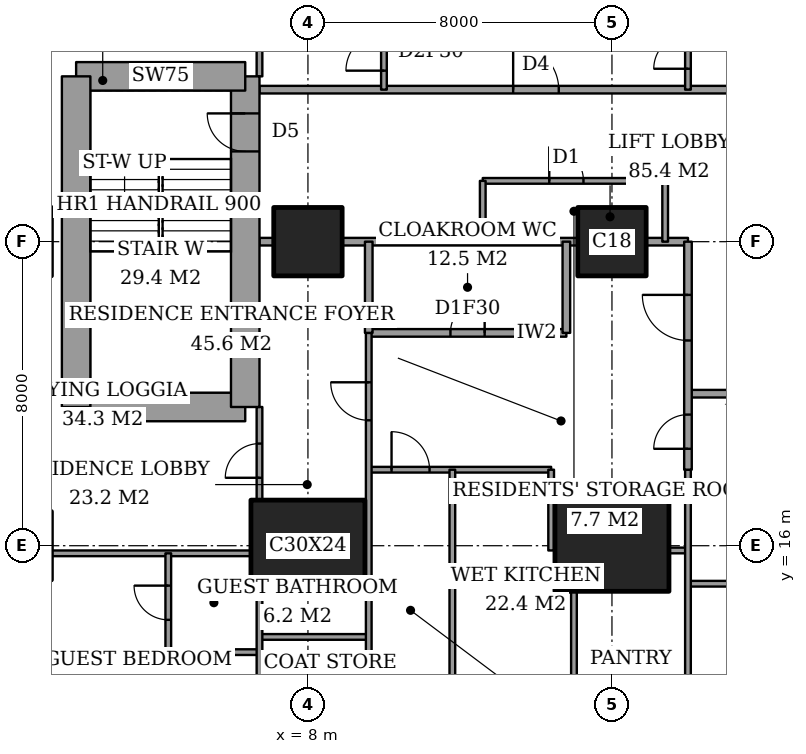
"""IFC4 building model, lengths in metres.
Left out: names, types, materials, properties, quantities, classifications, styles, units other than length and angle.
Written with IfcOpenShell. Run it as: python <this file> out.ifc"""

import sys

from ifc_helpers import new_model, si_unit, direction, frame, frame_2d, origin, origin_2d, place, context, subcontext, project, spatial, rectangle, extrude, element, fill, save


model = new_model("IFC4")
c1 = context("Model", 3, precision=1e-05, world=origin(), true_north=direction((0.0, 1.0)))
c2 = subcontext(c1, "Body", "Model", "MODEL_VIEW")
j1 = project(units=[si_unit("LENGTHUNIT", "METRE"), si_unit("PLANEANGLEUNIT", "RADIAN")], contexts=[c1])
p1 = place(None, origin())
s1 = spatial("IfcSite", under=j1, at=p1, CompositionType="ELEMENT")
p2 = place(p1, origin())
s2 = spatial("IfcBuilding", under=s1, at=p2, CompositionType="ELEMENT")
p3 = place(p2, frame((0.0, 0.0, 189.4)))
s3 = spatial("IfcBuildingStorey", under=s2, at=p3, CompositionType="ELEMENT", Elevation=189.4)
p4 = place(p3, frame((8.0, 16.0, 0.0), z_axis=(0.0, 0.0, 1.0), x_axis=(1.0, 0.0, 0.0)))
e1 = element("IfcColumn", 1, at=p4, inside=s3, PredefinedType="COLUMN", context=c2, shape_type="SweptSolid", body=[
    extrude(rectangle(XDim=3.0, YDim=2.4, at=origin_2d()), origin(), (0.0, 0.0, 1.0), 3.6),
])
p5 = place(p3, frame((8.0, 24.0, 0.0), z_axis=(0.0, 0.0, 1.0), x_axis=(1.0, 0.0, 0.0)))
e2 = element("IfcColumn", 2, at=p5, inside=s3, PredefinedType="COLUMN", context=c2, shape_type="SweptSolid", body=[
    extrude(rectangle(XDim=1.8, YDim=1.8, at=origin_2d()), origin(), (0.0, 0.0, 1.0), 3.6),
])
p6 = place(p3, frame((16.0, 16.0, 0.0), z_axis=(0.0, 0.0, 1.0), x_axis=(1.0, 0.0, 0.0)))
e3 = element("IfcColumn", 3, at=p6, inside=s3, PredefinedType="COLUMN", context=c2, shape_type="SweptSolid", body=[
    extrude(rectangle(XDim=3.0, YDim=2.4, at=origin_2d()), origin(), (0.0, 0.0, 1.0), 3.6),
])
p7 = place(p3, frame((16.0, 24.0, 0.0), z_axis=(0.0, 0.0, 1.0), x_axis=(1.0, 0.0, 0.0)))
e4 = element("IfcColumn", 4, at=p7, inside=s3, PredefinedType="COLUMN", context=c2, shape_type="SweptSolid", body=[
    extrude(rectangle(XDim=1.8, YDim=1.8, at=origin_2d()), origin(), (0.0, 0.0, 1.0), 3.6),
])
p8 = place(p3, frame((1.9, 19.65, 0.0), z_axis=(0.0, 0.0, 1.0), x_axis=(1.0, 0.0, 0.0)))
e5 = element("IfcWall", 5, at=p8, inside=s3, PredefinedType="SHEAR", context=c2, shape_type="SweptSolid", body=[
    extrude(rectangle(XDim=4.45, YDim=0.75, at=frame_2d((2.225, 0.0))), origin(), (0.0, 0.0, 1.0), 3.6),
])
p9 = place(p3, frame((6.35, 19.65, 0.0), z_axis=(0.0, 0.0, 1.0), x_axis=(0.0, 1.0, 0.0)))
e6 = element("IfcWall", 6, at=p9, inside=s3, PredefinedType="SHEAR", context=c2, shape_type="SweptSolid", body=[
    extrude(rectangle(XDim=8.7, YDim=0.75, at=frame_2d((4.35, 0.0))), origin(), (0.0, 0.0, 1.0), 3.6),
])
p10 = place(p9, frame((6.725, 0.0, 0.0)))
e7 = element("IfcOpeningElement", 7, at=p10, cuts=e6, PredefinedType="OPENING", context=c2, shape_type="SweptSolid", body=[
    extrude(rectangle(XDim=1.0, YDim=2.1, at=frame_2d((0.5, 1.05))), frame((0.0, 0.385, 0.0), z_axis=(0.0, -1.0, 0.0), x_axis=(1.0, 0.0, 0.0)), (0.0, 0.0, 1.0), 0.77),
])
p11 = place(p3, frame((6.35, 28.35, 0.0), z_axis=(0.0, 0.0, 1.0), x_axis=(-1.0, 0.0, 0.0)))
e8 = element("IfcWall", 8, at=p11, inside=s3, PredefinedType="SHEAR", context=c2, shape_type="SweptSolid", body=[
    extrude(rectangle(XDim=4.45, YDim=0.75, at=frame_2d((2.225, 0.0))), origin(), (0.0, 0.0, 1.0), 3.6),
])
p12 = place(p3, frame((1.9, 28.35, 0.0), z_axis=(0.0, 0.0, 1.0), x_axis=(0.0, -1.0, 0.0)))
e9 = element("IfcWall", 9, at=p12, inside=s3, PredefinedType="SHEAR", context=c2, shape_type="SweptSolid", body=[
    extrude(rectangle(XDim=8.7, YDim=0.75, at=frame_2d((4.35, 0.0))), origin(), (0.0, 0.0, 1.0), 3.6),
])
p13 = place(p3, frame((4.325, 13.2, 0.0), z_axis=(0.0, 0.0, 1.0), x_axis=(1.0, 0.0, 0.0)))
e10 = element("IfcWall", 10, at=p13, inside=s3, PredefinedType="PARTITIONING", context=c2, shape_type="SweptSolid", body=[
    extrude(rectangle(XDim=2.4, YDim=0.15, at=frame_2d((1.2, 0.0))), origin(), (0.0, 0.0, 1.0), 3.35),
])
p14 = place(p3, frame((6.725, 13.6, 0.0), z_axis=(0.0, 0.0, 1.0), x_axis=(1.0, 0.0, 0.0)))
e11 = element("IfcWall", 11, at=p14, inside=s3, PredefinedType="PARTITIONING", context=c2, shape_type="SweptSolid", body=[
    extrude(rectangle(XDim=2.875, YDim=0.15, at=frame_2d((1.438, 0.0))), origin(), (0.0, 0.0, 1.0), 3.35),
])
p15 = place(p3, frame((18.0, 15.0, 0.0), z_axis=(0.0, 0.0, 1.0), x_axis=(1.0, 0.0, 0.0)))
e12 = element("IfcWall", 12, at=p15, inside=s3, PredefinedType="PARTITIONING", context=c2, shape_type="SweptSolid", body=[
    extrude(rectangle(XDim=6.0, YDim=0.15, at=frame_2d((3.0, 0.0))), origin(), (0.0, 0.0, 1.0), 3.35),
])
p16 = place(p3, frame((1.25, 15.8, 0.0), z_axis=(0.0, 0.0, 1.0), x_axis=(1.0, 0.0, 0.0)))
e13 = element("IfcWall", 13, at=p16, inside=s3, PredefinedType="PARTITIONING", context=c2, shape_type="SweptSolid", body=[
    extrude(rectangle(XDim=5.25, YDim=0.15, at=frame_2d((2.625, 0.0))), origin(), (0.0, 0.0, 1.0), 3.35),
])
p17 = place(p3, frame((17.5, 15.875, 0.0), z_axis=(0.0, 0.0, 1.0), x_axis=(1.0, 0.0, 0.0)))
e14 = element("IfcWall", 14, at=p17, inside=s3, PredefinedType="PARTITIONING", context=c2, shape_type="SweptSolid", body=[
    extrude(rectangle(XDim=0.5, YDim=0.15, at=frame_2d((0.25, 0.0))), origin(), (0.0, 0.0, 1.0), 2.634),
])
p18 = place(p3, frame((9.6, 18.0, 0.0), z_axis=(0.0, 0.0, 1.0), x_axis=(1.0, 0.0, 0.0)))
e15 = element("IfcWall", 15, at=p18, inside=s3, PredefinedType="PARTITIONING", context=c2, shape_type="SweptSolid", body=[
    extrude(rectangle(XDim=4.8, YDim=0.15, at=frame_2d((2.4, 0.0))), origin(), (0.0, 0.0, 1.0), 3.35),
])
p19 = place(p18, frame((0.6, 0.0, 0.0)))
e16 = element("IfcOpeningElement", 16, at=p19, cuts=e15, PredefinedType="OPENING", context=c2, shape_type="SweptSolid", body=[
    extrude(rectangle(XDim=1.0, YDim=2.1, at=frame_2d((0.5, 1.05))), frame((0.0, 0.085, 0.0), z_axis=(0.0, -1.0, 0.0), x_axis=(1.0, 0.0, 0.0)), (0.0, 0.0, 1.0), 0.17),
])
p20 = place(p3, frame((18.0, 20.0, 0.0), z_axis=(0.0, 0.0, 1.0), x_axis=(1.0, 0.0, 0.0)))
e17 = element("IfcWall", 17, at=p20, inside=s3, PredefinedType="PARTITIONING", context=c2, shape_type="SweptSolid", body=[
    extrude(rectangle(XDim=6.0, YDim=0.2, at=frame_2d((3.0, 0.0))), origin(), (0.0, 0.0, 1.0), 3.35),
])
p21 = place(p3, frame((9.6, 21.6, 0.0), z_axis=(0.0, 0.0, 1.0), x_axis=(1.0, 0.0, 0.0)))
e18 = element("IfcWall", 18, at=p21, inside=s3, PredefinedType="PARTITIONING", context=c2, shape_type="SweptSolid", body=[
    extrude(rectangle(XDim=5.2, YDim=0.2, at=frame_2d((2.6, 0.0))), origin(), (0.0, 0.0, 1.0), 3.35),
])
p22 = place(p21, frame((2.15, 0.0, 0.0)))
e19 = element("IfcOpeningElement", 19, at=p22, cuts=e18, PredefinedType="OPENING", context=c2, shape_type="SweptSolid", body=[
    extrude(rectangle(XDim=0.9, YDim=2.1, at=frame_2d((0.45, 1.05))), frame((0.0, 0.11, 0.0), z_axis=(0.0, -1.0, 0.0), x_axis=(1.0, 0.0, 0.0)), (0.0, 0.0, 1.0), 0.22),
])
p23 = place(p3, frame((6.725, 24.0, 0.0), z_axis=(0.0, 0.0, 1.0), x_axis=(1.0, 0.0, 0.0)))
e20 = element("IfcWall", 20, at=p23, inside=s3, PredefinedType="PARTITIONING", context=c2, shape_type="SweptSolid", body=[
    extrude(rectangle(XDim=0.375, YDim=0.2, at=frame_2d((0.188, 0.0))), origin(), (0.0, 0.0, 1.0), 3.35),
])
p24 = place(p3, frame((8.9, 24.0, 0.0), z_axis=(0.0, 0.0, 1.0), x_axis=(1.0, 0.0, 0.0)))
e21 = element("IfcWall", 21, at=p24, inside=s3, PredefinedType="PARTITIONING", context=c2, shape_type="SweptSolid", body=[
    extrude(rectangle(XDim=6.2, YDim=0.2, at=frame_2d((3.1, 0.0))), origin(), (0.0, 0.0, 1.0), 3.35),
])
p25 = place(p3, frame((16.9, 24.0, 0.0), z_axis=(0.0, 0.0, 1.0), x_axis=(1.0, 0.0, 0.0)))
e22 = element("IfcWall", 22, at=p25, inside=s3, PredefinedType="PARTITIONING", context=c2, shape_type="SweptSolid", body=[
    extrude(rectangle(XDim=1.1, YDim=0.2, at=frame_2d((0.55, 0.0))), origin(), (0.0, 0.0, 1.0), 3.35),
])
p26 = place(p3, frame((12.6, 25.6, 0.0), z_axis=(0.0, 0.0, 1.0), x_axis=(1.0, 0.0, 0.0)))
e23 = element("IfcWall", 23, at=p26, inside=s3, PredefinedType="PARTITIONING", context=c2, shape_type="SweptSolid", body=[
    extrude(rectangle(XDim=4.8, YDim=0.15, at=frame_2d((2.4, 0.0))), origin(), (0.0, 0.0, 1.0), 3.35),
])
p27 = place(p26, frame((1.75, 0.0, 0.0)))
e24 = element("IfcOpeningElement", 24, at=p27, cuts=e23, PredefinedType="OPENING", context=c2, shape_type="SweptSolid", body=[
    extrude(rectangle(XDim=0.9, YDim=2.1, at=frame_2d((0.45, 1.05))), frame((0.0, 0.085, 0.0), z_axis=(0.0, -1.0, 0.0), x_axis=(1.0, 0.0, 0.0)), (0.0, 0.0, 1.0), 0.17),
])
p28 = place(p3, frame((6.725, 28.0, 0.0), z_axis=(0.0, 0.0, 1.0), x_axis=(1.0, 0.0, 0.0)))
e25 = element("IfcWall", 25, at=p28, inside=s3, PredefinedType="PARTITIONING", context=c2, shape_type="SweptSolid", body=[
    extrude(rectangle(XDim=17.275, YDim=0.2, at=frame_2d((8.637, 0.0))), origin(), (0.0, 0.0, 1.0), 3.35),
])
p29 = place(p28, frame((6.675, 0.0, 0.0)))
e26 = element("IfcOpeningElement", 26, at=p29, cuts=e25, PredefinedType="OPENING", context=c2, shape_type="SweptSolid", body=[
    extrude(rectangle(XDim=1.2, YDim=2.4, at=frame_2d((0.6, 1.2))), frame((0.0, 0.11, 0.0), z_axis=(0.0, -1.0, 0.0), x_axis=(1.0, 0.0, 0.0)), (0.0, 0.0, 1.0), 0.22),
])
p30 = place(p3, frame((4.325, 13.2, 0.0), z_axis=(0.0, 0.0, 1.0), x_axis=(0.0, 1.0, 0.0)))
e27 = element("IfcWall", 27, at=p30, inside=s3, PredefinedType="PARTITIONING", context=c2, shape_type="SweptSolid", body=[
    extrude(rectangle(XDim=2.6, YDim=0.15, at=frame_2d((1.3, 0.0))), origin(), (0.0, 0.0, 1.0), 3.35),
])
p31 = place(p30, frame((0.85, 0.0, 0.0)))
e28 = element("IfcOpeningElement", 28, at=p31, cuts=e27, PredefinedType="OPENING", context=c2, shape_type="SweptSolid", body=[
    extrude(rectangle(XDim=0.9, YDim=2.1, at=frame_2d((0.45, 1.05))), frame((0.0, 0.085, 0.0), z_axis=(0.0, -1.0, 0.0), x_axis=(1.0, 0.0, 0.0)), (0.0, 0.0, 1.0), 0.17),
])
p32 = place(p3, frame((6.725, 10.6, 0.0), z_axis=(0.0, 0.0, 1.0), x_axis=(0.0, 1.0, 0.0)))
e29 = element("IfcWall", 29, at=p32, inside=s3, PredefinedType="PARTITIONING", context=c2, shape_type="SweptSolid", body=[
    extrude(rectangle(XDim=4.2, YDim=0.15, at=frame_2d((2.1, 0.0))), origin(), (0.0, 0.0, 1.0), 3.35),
])
p33 = place(p3, frame((6.725, 17.2, 0.0), z_axis=(0.0, 0.0, 1.0), x_axis=(0.0, 1.0, 0.0)))
e30 = element("IfcWall", 30, at=p33, inside=s3, PredefinedType="PARTITIONING", context=c2, shape_type="SweptSolid", body=[
    extrude(rectangle(XDim=2.45, YDim=0.15, at=frame_2d((1.225, 0.0))), origin(), (0.0, 0.0, 1.0), 3.35),
])
p34 = place(p33, frame((0.587, 0.0, 0.0)))
e31 = element("IfcOpeningElement", 31, at=p34, cuts=e30, PredefinedType="OPENING", context=c2, shape_type="SweptSolid", body=[
    extrude(rectangle(XDim=0.9, YDim=2.1, at=frame_2d((0.45, 1.05))), frame((0.0, 0.085, 0.0), z_axis=(0.0, -1.0, 0.0), x_axis=(1.0, 0.0, 0.0)), (0.0, 0.0, 1.0), 0.17),
])
p35 = place(p3, frame((6.725, 28.35, 0.0), z_axis=(0.0, 0.0, 1.0), x_axis=(0.0, 1.0, 0.0)))
e32 = element("IfcWall", 32, at=p35, inside=s3, PredefinedType="PARTITIONING", context=c2, shape_type="SweptSolid", body=[
    extrude(rectangle(XDim=2.45, YDim=0.15, at=frame_2d((1.225, 0.0))), origin(), (0.0, 0.0, 1.0), 3.35),
])
p36 = place(p35, frame((0.913, 0.0, 0.0)))
e33 = element("IfcOpeningElement", 33, at=p36, cuts=e32, PredefinedType="OPENING", context=c2, shape_type="SweptSolid", body=[
    extrude(rectangle(XDim=1.0, YDim=2.1, at=frame_2d((0.5, 1.05))), frame((0.0, 0.085, 0.0), z_axis=(0.0, -1.0, 0.0), x_axis=(1.0, 0.0, 0.0)), (0.0, 0.0, 1.0), 0.17),
])
p37 = place(p3, frame((9.6, 21.6, 0.0), z_axis=(0.0, 0.0, 1.0), x_axis=(0.0, 1.0, 0.0)))
e34 = element("IfcWall", 34, at=p37, inside=s3, PredefinedType="PARTITIONING", context=c2, shape_type="SweptSolid", body=[
    extrude(rectangle(XDim=2.4, YDim=0.2, at=frame_2d((1.2, 0.0))), origin(), (0.0, 0.0, 1.0), 3.35),
])
p38 = place(p3, frame((9.6, 10.6, 0.0), z_axis=(0.0, 0.0, 1.0), x_axis=(0.0, 1.0, 0.0)))
e35 = element("IfcWall", 35, at=p38, inside=s3, PredefinedType="PARTITIONING", context=c2, shape_type="SweptSolid", body=[
    extrude(rectangle(XDim=11.0, YDim=0.15, at=frame_2d((5.5, 0.0))), origin(), (0.0, 0.0, 1.0), 3.35),
])
p39 = place(p38, frame((8.7, 0.0, 0.0)))
e36 = element("IfcOpeningElement", 36, at=p39, cuts=e35, PredefinedType="OPENING", context=c2, shape_type="SweptSolid", body=[
    extrude(rectangle(XDim=1.0, YDim=2.1, at=frame_2d((0.5, 1.05))), frame((0.0, 0.085, 0.0), z_axis=(0.0, -1.0, 0.0), x_axis=(1.0, 0.0, 0.0)), (0.0, 0.0, 1.0), 0.17),
])
p40 = place(p3, frame((10.0, 28.0, 0.0), z_axis=(0.0, 0.0, 1.0), x_axis=(0.0, 1.0, 0.0)))
e37 = element("IfcWall", 37, at=p40, inside=s3, PredefinedType="PARTITIONING", context=c2, shape_type="SweptSolid", body=[
    extrude(rectangle(XDim=9.4, YDim=0.15, at=frame_2d((4.7, 0.0))), origin(), (0.0, 0.0, 1.0), 3.35),
])
p41 = place(p40, frame((0.5, 0.0, 0.0)))
e38 = element("IfcOpeningElement", 38, at=p41, cuts=e37, PredefinedType="OPENING", context=c2, shape_type="SweptSolid", body=[
    extrude(rectangle(XDim=1.0, YDim=2.1, at=frame_2d((0.5, 1.05))), frame((0.0, 0.085, 0.0), z_axis=(0.0, -1.0, 0.0), x_axis=(1.0, 0.0, 0.0)), (0.0, 0.0, 1.0), 0.17),
])
p42 = place(p3, frame((11.8, 10.6, 0.0), z_axis=(0.0, 0.0, 1.0), x_axis=(0.0, 1.0, 0.0)))
e39 = element("IfcWall", 39, at=p42, inside=s3, PredefinedType="PARTITIONING", context=c2, shape_type="SweptSolid", body=[
    extrude(rectangle(XDim=7.4, YDim=0.15, at=frame_2d((3.7, 0.0))), origin(), (0.0, 0.0, 1.0), 3.35),
])
p43 = place(p3, frame((12.6, 24.0, 0.0), z_axis=(0.0, 0.0, 1.0), x_axis=(0.0, 1.0, 0.0)))
e40 = element("IfcWall", 40, at=p43, inside=s3, PredefinedType="PARTITIONING", context=c2, shape_type="SweptSolid", body=[
    extrude(rectangle(XDim=1.6, YDim=0.15, at=frame_2d((0.8, 0.0))), origin(), (0.0, 0.0, 1.0), 3.35),
])
p44 = place(p3, frame((14.4, 15.875, 0.0), z_axis=(0.0, 0.0, 1.0), x_axis=(0.0, 1.0, 0.0)))
e41 = element("IfcWall", 41, at=p44, inside=s3, PredefinedType="PARTITIONING", context=c2, shape_type="SweptSolid", body=[
    extrude(rectangle(XDim=2.125, YDim=0.15, at=frame_2d((1.062, 0.0))), origin(), (0.0, 0.0, 1.0), 3.35),
])
p45 = place(p3, frame((14.8, 21.6, 0.0), z_axis=(0.0, 0.0, 1.0), x_axis=(0.0, 1.0, 0.0)))
e42 = element("IfcWall", 42, at=p45, inside=s3, PredefinedType="PARTITIONING", context=c2, shape_type="SweptSolid", body=[
    extrude(rectangle(XDim=2.4, YDim=0.2, at=frame_2d((1.2, 0.0))), origin(), (0.0, 0.0, 1.0), 3.35),
])
p46 = place(p3, frame((15.0, 10.6, 0.0), z_axis=(0.0, 0.0, 1.0), x_axis=(0.0, 1.0, 0.0)))
e43 = element("IfcWall", 43, at=p46, inside=s3, PredefinedType="PARTITIONING", context=c2, shape_type="SweptSolid", body=[
    extrude(rectangle(XDim=4.2, YDim=0.15, at=frame_2d((2.1, 0.0))), origin(), (0.0, 0.0, 1.0), 3.35),
])
p47 = place(p3, frame((17.4, 24.0, 0.0), z_axis=(0.0, 0.0, 1.0), x_axis=(0.0, 1.0, 0.0)))
e44 = element("IfcWall", 44, at=p47, inside=s3, PredefinedType="PARTITIONING", context=c2, shape_type="SweptSolid", body=[
    extrude(rectangle(XDim=1.6, YDim=0.15, at=frame_2d((0.8, 0.0))), origin(), (0.0, 0.0, 1.0), 3.35),
])
p48 = place(p3, frame((18.0, 18.0, 0.0), z_axis=(0.0, 0.0, 1.0), x_axis=(0.0, 1.0, 0.0)))
e45 = element("IfcWall", 45, at=p48, inside=s3, PredefinedType="PARTITIONING", context=c2, shape_type="SweptSolid", body=[
    extrude(rectangle(XDim=6.0, YDim=0.2, at=frame_2d((3.0, 0.0))), origin(), (0.0, 0.0, 1.0), 3.35),
])
p49 = place(p48, frame((3.4, 0.0, 0.0)))
e46 = element("IfcOpeningElement", 46, at=p49, cuts=e45, PredefinedType="OPENING", context=c2, shape_type="SweptSolid", body=[
    extrude(rectangle(XDim=1.2, YDim=2.4, at=frame_2d((0.6, 1.2))), frame((0.0, 0.11, 0.0), z_axis=(0.0, -1.0, 0.0), x_axis=(1.0, 0.0, 0.0)), (0.0, 0.0, 1.0), 0.22),
])
p50 = place(p48, frame((0.55, 0.0, 0.0)))
e47 = element("IfcOpeningElement", 47, at=p50, cuts=e45, PredefinedType="OPENING", context=c2, shape_type="SweptSolid", body=[
    extrude(rectangle(XDim=0.9, YDim=2.1, at=frame_2d((0.45, 1.05))), frame((0.0, 0.11, 0.0), z_axis=(0.0, -1.0, 0.0), x_axis=(1.0, 0.0, 0.0)), (0.0, 0.0, 1.0), 0.22),
])
p51 = place(p3, frame((18.0, 10.6, 0.0), z_axis=(0.0, 0.0, 1.0), x_axis=(0.0, 1.0, 0.0)))
e48 = element("IfcWall", 48, at=p51, inside=s3, PredefinedType="PARTITIONING", context=c2, shape_type="SweptSolid", body=[
    extrude(rectangle(XDim=7.4, YDim=0.15, at=frame_2d((3.7, 0.0))), origin(), (0.0, 0.0, 1.0), 3.35),
])
p52 = place(p3, frame((18.0, 28.0, 0.0), z_axis=(0.0, 0.0, 1.0), x_axis=(0.0, 1.0, 0.0)))
e49 = element("IfcWall", 49, at=p52, inside=s3, PredefinedType="PARTITIONING", context=c2, shape_type="SweptSolid", body=[
    extrude(rectangle(XDim=9.4, YDim=0.15, at=frame_2d((4.7, 0.0))), origin(), (0.0, 0.0, 1.0), 3.35),
])
p53 = place(p52, frame((0.55, 0.0, 0.0)))
e50 = element("IfcOpeningElement", 50, at=p53, cuts=e49, PredefinedType="OPENING", context=c2, shape_type="SweptSolid", body=[
    extrude(rectangle(XDim=0.9, YDim=2.1, at=frame_2d((0.45, 1.05))), frame((0.0, 0.085, 0.0), z_axis=(0.0, -1.0, 0.0), x_axis=(1.0, 0.0, 0.0)), (0.0, 0.0, 1.0), 0.17),
])
p54 = place(p31, origin())
e51 = element("IfcDoor", 51, at=p54, inside=s3, OperationType="SINGLE_SWING_LEFT", PredefinedType="DOOR", context=c2, shape_type="SweptSolid", body=[
    extrude(rectangle(XDim=0.9, YDim=2.1, at=frame_2d((0.45, 1.05))), frame((0.0, 0.025, 0.0), z_axis=(0.0, -1.0, 0.0), x_axis=(1.0, 0.0, 0.0)), (0.0, 0.0, 1.0), 0.05),
])
fill(e28, e51)
p55 = place(p34, origin())
e52 = element("IfcDoor", 52, at=p55, inside=s3, OperationType="SINGLE_SWING_RIGHT", PredefinedType="DOOR", context=c2, shape_type="SweptSolid", body=[
    extrude(rectangle(XDim=0.9, YDim=2.1, at=frame_2d((0.45, 1.05))), frame((0.0, 0.025, 0.0), z_axis=(0.0, -1.0, 0.0), x_axis=(1.0, 0.0, 0.0)), (0.0, 0.0, 1.0), 0.05),
])
fill(e31, e52)
p56 = place(p39, origin())
e53 = element("IfcDoor", 53, at=p56, inside=s3, OperationType="SINGLE_SWING_LEFT", PredefinedType="DOOR", context=c2, shape_type="SweptSolid", body=[
    extrude(rectangle(XDim=1.0, YDim=2.1, at=frame_2d((0.5, 1.05))), frame((0.0, 0.025, 0.0), z_axis=(0.0, -1.0, 0.0), x_axis=(1.0, 0.0, 0.0)), (0.0, 0.0, 1.0), 0.05),
])
fill(e36, e53)
p57 = place(p22, origin())
e54 = element("IfcDoor", 54, at=p57, inside=s3, OperationType="SINGLE_SWING_LEFT", PredefinedType="DOOR", context=c2, shape_type="SweptSolid", body=[
    extrude(rectangle(XDim=0.9, YDim=2.1, at=frame_2d((0.45, 1.05))), frame((0.0, 0.025, 0.0), z_axis=(0.0, -1.0, 0.0), x_axis=(1.0, 0.0, 0.0)), (0.0, 0.0, 1.0), 0.05),
])
fill(e19, e54)
p58 = place(p49, origin())
e55 = element("IfcDoor", 55, at=p58, inside=s3, OperationType="SINGLE_SWING_LEFT", PredefinedType="DOOR", context=c2, shape_type="SweptSolid", body=[
    extrude(rectangle(XDim=1.2, YDim=2.4, at=frame_2d((0.6, 1.2))), frame((0.0, 0.025, 0.0), z_axis=(0.0, -1.0, 0.0), x_axis=(1.0, 0.0, 0.0)), (0.0, 0.0, 1.0), 0.05),
])
fill(e46, e55)
p59 = place(p19, origin())
e56 = element("IfcDoor", 56, at=p59, inside=s3, OperationType="SINGLE_SWING_RIGHT", PredefinedType="DOOR", context=c2, shape_type="SweptSolid", body=[
    extrude(rectangle(XDim=1.0, YDim=2.1, at=frame_2d((0.5, 1.05))), frame((0.0, 0.025, 0.0), z_axis=(0.0, -1.0, 0.0), x_axis=(1.0, 0.0, 0.0)), (0.0, 0.0, 1.0), 0.05),
])
fill(e16, e56)
p60 = place(p50, origin())
e57 = element("IfcDoor", 57, at=p60, inside=s3, OperationType="SINGLE_SWING_RIGHT", PredefinedType="DOOR", context=c2, shape_type="SweptSolid", body=[
    extrude(rectangle(XDim=0.9, YDim=2.1, at=frame_2d((0.45, 1.05))), frame((0.0, 0.025, 0.0), z_axis=(0.0, -1.0, 0.0), x_axis=(1.0, 0.0, 0.0)), (0.0, 0.0, 1.0), 0.05),
])
fill(e47, e57)
p61 = place(p41, origin())
e58 = element("IfcDoor", 58, at=p61, inside=s3, OperationType="SINGLE_SWING_RIGHT", PredefinedType="DOOR", context=c2, shape_type="SweptSolid", body=[
    extrude(rectangle(XDim=1.0, YDim=2.1, at=frame_2d((0.5, 1.05))), frame((0.0, 0.025, 0.0), z_axis=(0.0, -1.0, 0.0), x_axis=(1.0, 0.0, 0.0)), (0.0, 0.0, 1.0), 0.05),
])
fill(e38, e58)
p62 = place(p29, origin())
e59 = element("IfcDoor", 59, at=p62, inside=s3, OperationType="SINGLE_SWING_RIGHT", PredefinedType="DOOR", context=c2, shape_type="SweptSolid", body=[
    extrude(rectangle(XDim=1.2, YDim=2.4, at=frame_2d((0.6, 1.2))), frame((0.0, 0.025, 0.0), z_axis=(0.0, -1.0, 0.0), x_axis=(1.0, 0.0, 0.0)), (0.0, 0.0, 1.0), 0.05),
])
fill(e26, e59)
p63 = place(p53, origin())
e60 = element("IfcDoor", 60, at=p63, inside=s3, OperationType="SINGLE_SWING_RIGHT", PredefinedType="DOOR", context=c2, shape_type="SweptSolid", body=[
    extrude(rectangle(XDim=0.9, YDim=2.1, at=frame_2d((0.45, 1.05))), frame((0.0, 0.025, 0.0), z_axis=(0.0, -1.0, 0.0), x_axis=(1.0, 0.0, 0.0)), (0.0, 0.0, 1.0), 0.05),
])
fill(e50, e60)
p64 = place(p27, origin())
e61 = element("IfcDoor", 61, at=p64, inside=s3, OperationType="SINGLE_SWING_RIGHT", PredefinedType="DOOR", context=c2, shape_type="SweptSolid", body=[
    extrude(rectangle(XDim=0.9, YDim=2.1, at=frame_2d((0.45, 1.05))), frame((0.0, 0.025, 0.0), z_axis=(0.0, -1.0, 0.0), x_axis=(1.0, 0.0, 0.0)), (0.0, 0.0, 1.0), 0.05),
])
fill(e24, e61)
p65 = place(p10, origin())
e62 = element("IfcDoor", 62, at=p65, inside=s3, OperationType="SINGLE_SWING_LEFT", PredefinedType="DOOR", context=c2, shape_type="SweptSolid", body=[
    extrude(rectangle(XDim=1.0, YDim=2.1, at=frame_2d((0.5, 1.05))), frame((0.0, 0.025, 0.0), z_axis=(0.0, -1.0, 0.0), x_axis=(1.0, 0.0, 0.0)), (0.0, 0.0, 1.0), 0.05),
])
fill(e7, e62)
save(model, sys.argv[1])
